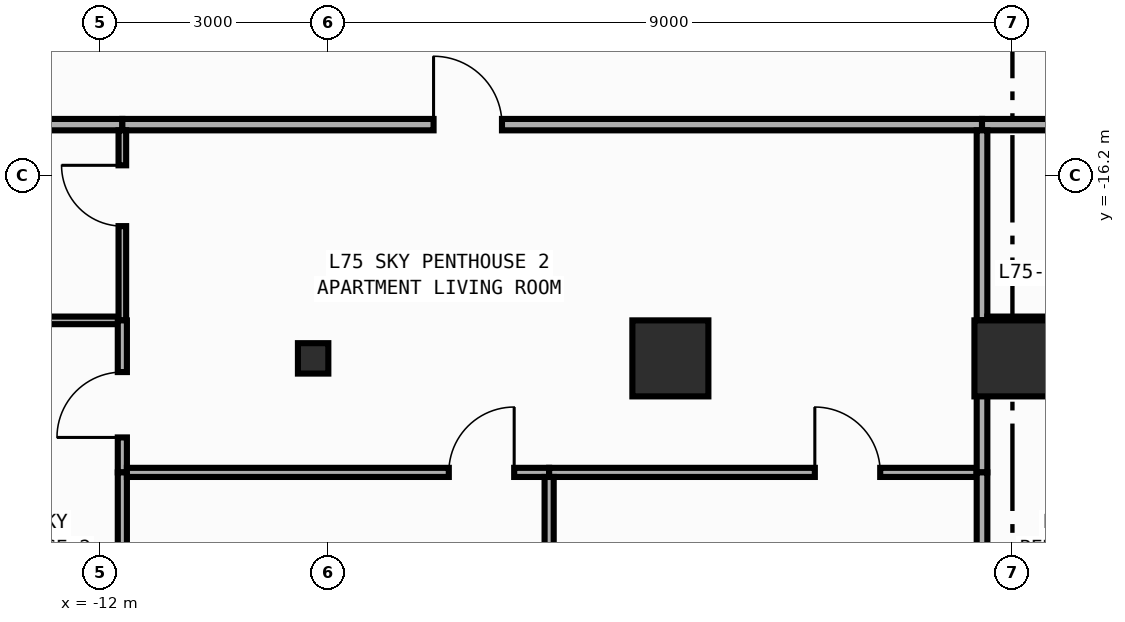
"""IFC4 building model, lengths in metres.
Left out: names, types, materials, properties, quantities, classifications, styles, units other than length and angle.
Written with IfcOpenShell. Run it as: python <this file> out.ifc"""

import sys

from ifc_helpers import new_model, si_unit, direction, frame, frame_2d, origin, origin_2d, place, context, subcontext, project, spatial, rectangle, circle, i_section, extrude, element, fill, save


model = new_model("IFC4")
c1 = context("Model", 3, precision=1e-05, world=origin(), true_north=direction((0.0, 1.0)))
c2 = subcontext(c1, "Body", "Model", "MODEL_VIEW")
j1 = project(units=[si_unit("LENGTHUNIT", "METRE"), si_unit("PLANEANGLEUNIT", "RADIAN")], contexts=[c1])
p1 = place(None, origin())
s1 = spatial("IfcSite", under=j1, at=p1, CompositionType="ELEMENT")
p2 = place(p1, origin())
s2 = spatial("IfcBuilding", under=s1, at=p2, CompositionType="ELEMENT")
p3 = place(p2, frame((0.0, 0.0, 311.8)))
s3 = spatial("IfcBuildingStorey", under=s2, at=p3, CompositionType="ELEMENT", Elevation=311.8)
p4 = place(p3, frame((-9.2, -18.6, 0.0), z_axis=(0.0, 0.0, 1.0), x_axis=(1.0, 0.0, 0.0)))
e1 = element("IfcColumn", 1, at=p4, inside=s3, PredefinedType="COLUMN", context=c2, shape_type="SweptSolid", body=[
    extrude(i_section(OverallWidth=0.4, OverallDepth=0.4, WebThickness=0.013, FlangeThickness=0.021, FilletRadius=0.022, at=origin_2d()), origin(), (0.0, 0.0, 1.0), 3.8),
])
for number, where, z_axis, x_axis in (
    (2, (-4.5, -18.6, 0.0), (0.0, 0.0, 1.0), (1.0, 0.0, 0.0)),
    (3, (0.0, -18.6, 0.0), (0.0, 0.0, 1.0), (1.0, 0.0, 0.0)),
):
    element("IfcColumn", number, at=place(p3, frame(where, z_axis=z_axis, x_axis=x_axis)), inside=s3, PredefinedType="COLUMN", context=c2, shape_type="SweptSolid", body=[
        extrude(circle(Radius=0.5, at=origin_2d()), origin(), (0.0, 0.0, 1.0), 3.8),
    ])
p5 = place(p3, frame((-14.38, -15.525, 0.0), z_axis=(0.0, 0.0, 1.0), x_axis=(1.0, 0.0, 0.0)))
e4 = element("IfcWall", 4, at=p5, inside=s3, PredefinedType="PARTITIONING", context=c2, shape_type="SweptSolid", body=[
    extrude(rectangle(XDim=2.67, YDim=0.15, at=frame_2d((1.335, 0.0))), origin(), (0.0, 0.0, 1.0), 3.54),
])
p6 = place(p3, frame((-11.71, -15.525, 0.0), z_axis=(0.0, 0.0, 1.0), x_axis=(1.0, 0.0, 0.0)))
e5 = element("IfcWall", 5, at=p6, inside=s3, PredefinedType="PARTITIONING", context=c2, shape_type="SweptSolid", body=[
    extrude(rectangle(XDim=11.31, YDim=0.15, at=frame_2d((5.655, 0.0))), origin(), (0.0, 0.0, 1.0), 3.54),
])
p7 = place(p6, frame((4.094, 0.0, 0.0)))
e6 = element("IfcOpeningElement", 6, at=p7, cuts=e5, PredefinedType="OPENING", context=c2, shape_type="SweptSolid", body=[
    extrude(rectangle(XDim=0.9, YDim=2.15, at=frame_2d((0.45, 1.075))), frame((0.0, 0.085, 0.0), z_axis=(0.0, -1.0, 0.0), x_axis=(1.0, 0.0, 0.0)), (0.0, 0.0, 1.0), 0.17),
])
p8 = place(p3, frame((-0.4, -15.525, 0.0), z_axis=(0.0, 0.0, 1.0), x_axis=(1.0, 0.0, 0.0)))
e7 = element("IfcWall", 7, at=p8, inside=s3, PredefinedType="PARTITIONING", context=c2, shape_type="SweptSolid", body=[
    extrude(rectangle(XDim=2.59, YDim=0.15, at=frame_2d((1.295, 0.0))), origin(), (0.0, 0.0, 1.0), 3.54),
])
p9 = place(p3, frame((-14.38, -18.1, 0.0), z_axis=(0.0, 0.0, 1.0), x_axis=(1.0, 0.0, 0.0)))
e8 = element("IfcWall", 8, at=p9, inside=s3, PredefinedType="PARTITIONING", context=c2, shape_type="SweptSolid", body=[
    extrude(rectangle(XDim=2.62, YDim=0.1, at=frame_2d((1.31, 0.0))), origin(), (0.0, 0.0, 1.0), 3.54),
])
p10 = place(p3, frame((-11.71, -18.1, 0.0), z_axis=(0.0, 0.0, 1.0), x_axis=(0.0, 1.0, 0.0)))
e9 = element("IfcWall", 9, at=p10, inside=s3, PredefinedType="PARTITIONING", context=c2, shape_type="SweptSolid", body=[
    extrude(rectangle(XDim=2.5, YDim=0.1, at=frame_2d((1.25, 0.0))), origin(), (0.0, 0.0, 1.0), 3.54),
])
p11 = place(p10, frame((1.24, 0.0, 0.0)))
e10 = element("IfcOpeningElement", 10, at=p11, cuts=e9, PredefinedType="OPENING", context=c2, shape_type="SweptSolid", body=[
    extrude(rectangle(XDim=0.8, YDim=2.1, at=frame_2d((0.4, 1.05))), frame((0.0, 0.06, 0.0), z_axis=(0.0, -1.0, 0.0), x_axis=(1.0, 0.0, 0.0)), (0.0, 0.0, 1.0), 0.12),
])
p12 = place(p3, frame((-11.71, -20.1, 0.0), z_axis=(0.0, 0.0, 1.0), x_axis=(0.0, 1.0, 0.0)))
e11 = element("IfcWall", 11, at=p12, inside=s3, PredefinedType="PARTITIONING", context=c2, shape_type="SweptSolid", body=[
    extrude(rectangle(XDim=2.0, YDim=0.12, at=frame_2d((1.0, 0.0))), origin(), (0.0, 0.0, 1.0), 3.54),
])
p13 = place(p12, frame((0.46, 0.0, 0.0)))
e12 = element("IfcOpeningElement", 12, at=p13, cuts=e11, PredefinedType="OPENING", context=c2, shape_type="SweptSolid", body=[
    extrude(rectangle(XDim=0.86, YDim=2.15, at=frame_2d((0.43, 1.075))), frame((0.0, 0.07, 0.0), z_axis=(0.0, -1.0, 0.0), x_axis=(1.0, 0.0, 0.0)), (0.0, 0.0, 1.0), 0.14),
])
p14 = place(p3, frame((-11.71, -24.055, 0.0), z_axis=(0.0, 0.0, 1.0), x_axis=(0.0, 1.0, 0.0)))
e13 = element("IfcWall", 13, at=p14, inside=s3, PredefinedType="PARTITIONING", context=c2, shape_type="SweptSolid", body=[
    extrude(rectangle(XDim=3.955, YDim=0.12, at=frame_2d((1.978, 0.0))), origin(), (0.0, 0.0, 1.0), 3.54),
])
p15 = place(p3, frame((-11.65, -20.1, 0.0), z_axis=(0.0, 0.0, 1.0), x_axis=(1.0, 0.0, 0.0)))
e14 = element("IfcWall", 14, at=p15, inside=s3, PredefinedType="PARTITIONING", context=c2, shape_type="SweptSolid", body=[
    extrude(rectangle(XDim=5.555, YDim=0.12, at=frame_2d((2.777, 0.0))), origin(), (0.0, 0.0, 1.0), 3.54),
])
p16 = place(p15, frame((4.235, 0.0, 0.0)))
e15 = element("IfcOpeningElement", 15, at=p16, cuts=e14, PredefinedType="OPENING", context=c2, shape_type="SweptSolid", body=[
    extrude(rectangle(XDim=0.86, YDim=2.15, at=frame_2d((0.43, 1.075))), frame((0.0, 0.07, 0.0), z_axis=(0.0, -1.0, 0.0), x_axis=(1.0, 0.0, 0.0)), (0.0, 0.0, 1.0), 0.14),
])
p17 = place(p3, frame((-6.095, -20.1, 0.0), z_axis=(0.0, 0.0, 1.0), x_axis=(1.0, 0.0, 0.0)))
e16 = element("IfcWall", 16, at=p17, inside=s3, PredefinedType="PARTITIONING", context=c2, shape_type="SweptSolid", body=[
    extrude(rectangle(XDim=5.625, YDim=0.12, at=frame_2d((2.812, 0.0))), origin(), (0.0, 0.0, 1.0), 3.54),
])
p18 = place(p17, frame((3.496, 0.0, 0.0)))
e17 = element("IfcOpeningElement", 17, at=p18, cuts=e16, PredefinedType="OPENING", context=c2, shape_type="SweptSolid", body=[
    extrude(rectangle(XDim=0.86, YDim=2.15, at=frame_2d((0.43, 1.075))), frame((0.0, 0.07, 0.0), z_axis=(0.0, -1.0, 0.0), x_axis=(1.0, 0.0, 0.0)), (0.0, 0.0, 1.0), 0.14),
])
p19 = place(p3, frame((-0.4, -18.1, 0.0), z_axis=(0.0, 0.0, 1.0), x_axis=(0.0, 1.0, 0.0)))
e18 = element("IfcWall", 18, at=p19, inside=s3, PredefinedType="PARTITIONING", context=c2, shape_type="SweptSolid", body=[
    extrude(rectangle(XDim=2.5, YDim=0.14, at=frame_2d((1.25, 0.0))), origin(), (0.0, 0.0, 1.0), 3.54),
])
p20 = place(p3, frame((-0.4, -20.1, 0.0), z_axis=(0.0, 0.0, 1.0), x_axis=(0.0, 1.0, 0.0)))
e19 = element("IfcWall", 19, at=p20, inside=s3, PredefinedType="PARTITIONING", context=c2, shape_type="SweptSolid", body=[
    extrude(rectangle(XDim=2.0, YDim=0.14, at=frame_2d((1.0, 0.0))), origin(), (0.0, 0.0, 1.0), 3.54),
])
p21 = place(p3, frame((-6.095, -24.055, 0.0), z_axis=(0.0, 0.0, 1.0), x_axis=(0.0, 1.0, 0.0)))
e20 = element("IfcWall", 20, at=p21, inside=s3, PredefinedType="PARTITIONING", context=c2, shape_type="SweptSolid", body=[
    extrude(rectangle(XDim=3.895, YDim=0.12, at=frame_2d((1.948, 0.0))), origin(), (0.0, 0.0, 1.0), 3.54),
])
p22 = place(p3, frame((-0.4, -24.055, 0.0), z_axis=(0.0, 0.0, 1.0), x_axis=(0.0, 1.0, 0.0)))
e21 = element("IfcWall", 21, at=p22, inside=s3, PredefinedType="PARTITIONING", context=c2, shape_type="SweptSolid", body=[
    extrude(rectangle(XDim=3.955, YDim=0.14, at=frame_2d((1.978, 0.0))), origin(), (0.0, 0.0, 1.0), 3.54),
])
p23 = place(p3, frame((-0.33, -18.1, 0.0), z_axis=(0.0, 0.0, 1.0), x_axis=(1.0, 0.0, 0.0)))
e22 = element("IfcWall", 22, at=p23, inside=s3, PredefinedType="PARTITIONING", context=c2, shape_type="SweptSolid", body=[
    extrude(rectangle(XDim=2.47, YDim=0.1, at=frame_2d((1.235, 0.0))), origin(), (0.0, 0.0, 1.0), 3.54),
])
p24 = place(p7, origin())
e23 = element("IfcDoor", 23, at=p24, inside=s3, OperationType="SINGLE_SWING_LEFT", PredefinedType="DOOR", context=c2, shape_type="SweptSolid", body=[
    extrude(rectangle(XDim=0.9, YDim=2.15, at=frame_2d((0.45, 1.075))), frame((0.0, 0.025, 0.0), z_axis=(0.0, -1.0, 0.0), x_axis=(1.0, 0.0, 0.0)), (0.0, 0.0, 1.0), 0.05),
])
fill(e6, e23)
p25 = place(p11, origin())
e24 = element("IfcDoor", 24, at=p25, inside=s3, OperationType="SINGLE_SWING_RIGHT", PredefinedType="DOOR", context=c2, shape_type="SweptSolid", body=[
    extrude(rectangle(XDim=0.8, YDim=2.1, at=frame_2d((0.4, 1.05))), frame((0.0, 0.025, 0.0), z_axis=(0.0, -1.0, 0.0), x_axis=(1.0, 0.0, 0.0)), (0.0, 0.0, 1.0), 0.05),
])
fill(e10, e24)
p26 = place(p13, origin())
e25 = element("IfcDoor", 25, at=p26, inside=s3, OperationType="SINGLE_SWING_LEFT", PredefinedType="DOOR", context=c2, shape_type="SweptSolid", body=[
    extrude(rectangle(XDim=0.86, YDim=2.15, at=frame_2d((0.43, 1.075))), frame((0.0, 0.025, 0.0), z_axis=(0.0, -1.0, 0.0), x_axis=(1.0, 0.0, 0.0)), (0.0, 0.0, 1.0), 0.05),
])
fill(e12, e25)
p27 = place(p16, origin())
e26 = element("IfcDoor", 26, at=p27, inside=s3, OperationType="SINGLE_SWING_RIGHT", PredefinedType="DOOR", context=c2, shape_type="SweptSolid", body=[
    extrude(rectangle(XDim=0.86, YDim=2.15, at=frame_2d((0.43, 1.075))), frame((0.0, 0.025, 0.0), z_axis=(0.0, -1.0, 0.0), x_axis=(1.0, 0.0, 0.0)), (0.0, 0.0, 1.0), 0.05),
])
fill(e15, e26)
p28 = place(p18, origin())
e27 = element("IfcDoor", 27, at=p28, inside=s3, OperationType="SINGLE_SWING_LEFT", PredefinedType="DOOR", context=c2, shape_type="SweptSolid", body=[
    extrude(rectangle(XDim=0.86, YDim=2.15, at=frame_2d((0.43, 1.075))), frame((0.0, 0.025, 0.0), z_axis=(0.0, -1.0, 0.0), x_axis=(1.0, 0.0, 0.0)), (0.0, 0.0, 1.0), 0.05),
])
fill(e17, e27)
save(model, sys.argv[1])
